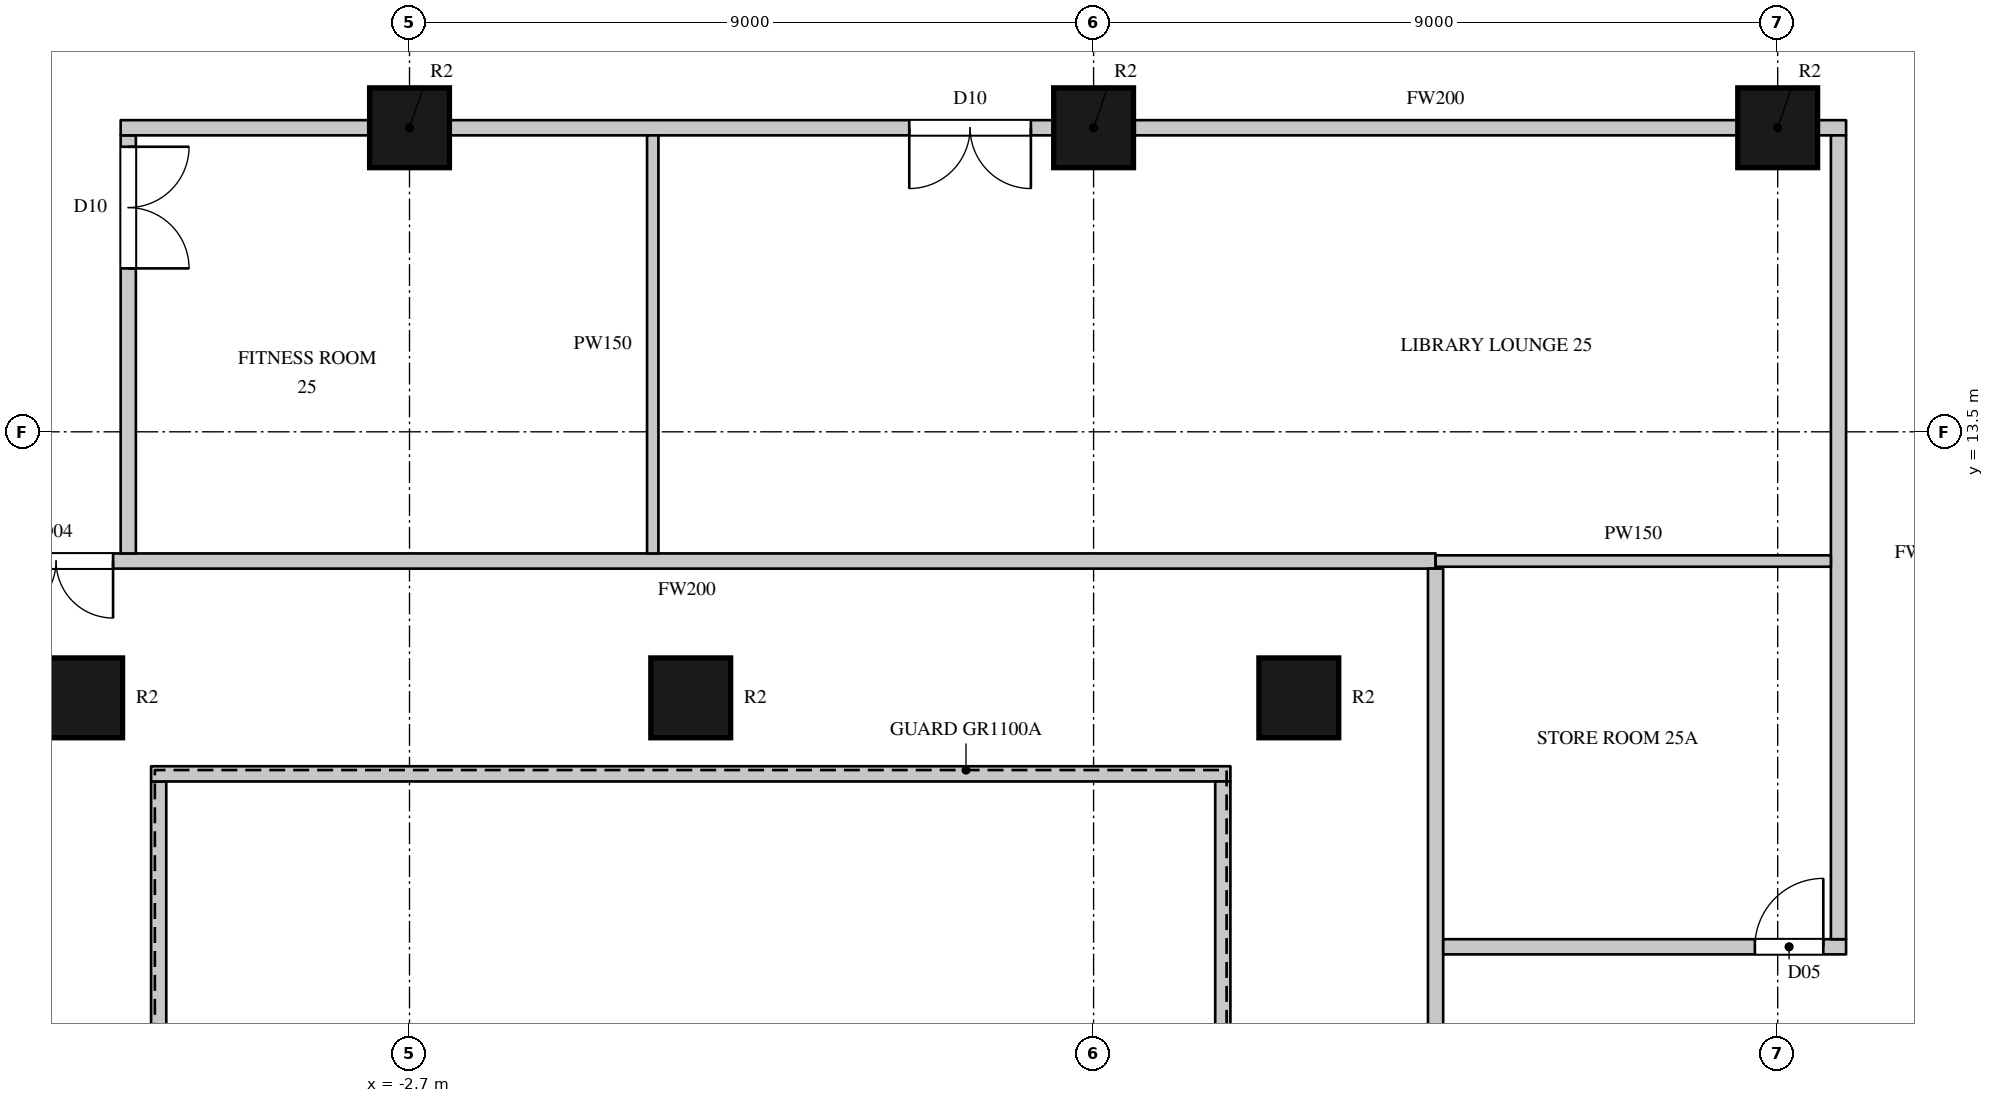
"""IFC4 building model, lengths in metres.
Left out: names, types, materials, properties, quantities, classifications, styles, units other than length and angle.
Written with IfcOpenShell. Run it as: python <this file> out.ifc"""

import sys

from ifc_helpers import new_model, si_unit, direction, frame, frame_2d, origin, origin_2d, place, context, subcontext, project, spatial, rectangle, circle, extrude, element, fill, save


model = new_model("IFC4")
c1 = context("Model", 3, precision=1e-05, world=origin(), true_north=direction((0.0, 1.0)))
c2 = subcontext(c1, "Body", "Model", "MODEL_VIEW")
j1 = project(units=[si_unit("LENGTHUNIT", "METRE"), si_unit("PLANEANGLEUNIT", "RADIAN")], contexts=[c1])
p1 = place(None, origin())
s1 = spatial("IfcSite", under=j1, at=p1, CompositionType="ELEMENT")
p2 = place(p1, origin())
s2 = spatial("IfcBuilding", under=s1, at=p2, CompositionType="ELEMENT")
p3 = place(p2, frame((0.0, 0.0, 120.3)))
s3 = spatial("IfcBuildingStorey", under=s2, at=p3, CompositionType="ELEMENT", Elevation=120.3)
for number, where, z_axis, x_axis in (
    (1, (-2.7, 17.5, 0.0), (0.0, 0.0, 1.0), (1.0, 0.0, 0.0)),
    (2, (6.3, 17.5, 0.0), (0.0, 0.0, 1.0), (1.0, 0.0, 0.0)),
    (3, (15.3, 17.5, 0.0), (0.0, 0.0, 1.0), (1.0, 0.0, 0.0)),
    (4, (-7.0, 10.0, 0.0), (0.0, 0.0, 1.0), (1.0, 0.0, 0.0)),
    (5, (1.0, 10.0, 0.0), (0.0, 0.0, 1.0), (1.0, 0.0, 0.0)),
    (6, (9.0, 10.0, 0.0), (0.0, 0.0, 1.0), (1.0, 0.0, 0.0)),
):
    element("IfcColumn", number, at=place(p3, frame(where, z_axis=z_axis, x_axis=x_axis)), inside=s3, PredefinedType="COLUMN", context=c2, shape_type="SweptSolid", body=[
        extrude(circle(Radius=0.525, at=origin_2d()), origin(), (0.0, 0.0, 1.0), 3.6),
    ])
p4 = place(p3, frame((-8.9, 11.8, 0.0), z_axis=(0.0, 0.0, 1.0), x_axis=(1.0, 0.0, 0.0)))
e7 = element("IfcWall", 7, at=p4, inside=s3, PredefinedType="PARTITIONING", context=c2, shape_type="SweptSolid", body=[
    extrude(rectangle(XDim=19.7, YDim=0.2, at=frame_2d((9.85, 0.0))), origin(), (0.0, 0.0, 1.0), 3.3),
])
p5 = place(p4, frame((0.8, 0.0, 0.0)))
e8 = element("IfcOpeningElement", 8, at=p5, cuts=e7, PredefinedType="OPENING", context=c2, shape_type="SweptSolid", body=[
    extrude(rectangle(XDim=1.5, YDim=2.2, at=frame_2d((0.75, 1.1))), frame((0.0, 0.11, 0.0), z_axis=(0.0, -1.0, 0.0), x_axis=(1.0, 0.0, 0.0)), (0.0, 0.0, 1.0), 0.22),
])
p6 = place(p3, frame((-6.4, 11.9, 0.0), z_axis=(0.0, 0.0, 1.0), x_axis=(0.0, 1.0, 0.0)))
e9 = element("IfcWall", 9, at=p6, inside=s3, PredefinedType="PARTITIONING", context=c2, shape_type="SweptSolid", body=[
    extrude(rectangle(XDim=5.5, YDim=0.2, at=frame_2d((2.75, 0.0))), origin(), (0.0, 0.0, 1.0), 3.3),
])
p7 = place(p6, frame((3.75, 0.0, 0.0)))
e10 = element("IfcOpeningElement", 10, at=p7, cuts=e9, PredefinedType="OPENING", context=c2, shape_type="SweptSolid", body=[
    extrude(rectangle(XDim=1.6, YDim=2.4, at=frame_2d((0.8, 1.2))), frame((0.0, 0.11, 0.0), z_axis=(0.0, -1.0, 0.0), x_axis=(1.0, 0.0, 0.0)), (0.0, 0.0, 1.0), 0.22),
])
p8 = place(p3, frame((-6.5, 17.5, 0.0), z_axis=(0.0, 0.0, 1.0), x_axis=(1.0, 0.0, 0.0)))
e11 = element("IfcWall", 11, at=p8, inside=s3, PredefinedType="PARTITIONING", context=c2, shape_type="SweptSolid", body=[
    extrude(rectangle(XDim=3.275, YDim=0.2, at=frame_2d((1.637, 0.0))), origin(), (0.0, 0.0, 1.0), 2.75),
])
p9 = place(p3, frame((-2.175, 17.5, 0.0), z_axis=(0.0, 0.0, 1.0), x_axis=(1.0, 0.0, 0.0)))
e12 = element("IfcWall", 12, at=p9, inside=s3, PredefinedType="PARTITIONING", context=c2, shape_type="SweptSolid", body=[
    extrude(rectangle(XDim=7.95, YDim=0.2, at=frame_2d((3.975, 0.0))), origin(), (0.0, 0.0, 1.0), 2.75),
])
p10 = place(p9, frame((6.05, 0.0, 0.0)))
e13 = element("IfcOpeningElement", 13, at=p10, cuts=e12, PredefinedType="OPENING", context=c2, shape_type="SweptSolid", body=[
    extrude(rectangle(XDim=1.6, YDim=2.4, at=frame_2d((0.8, 1.2))), frame((0.0, 0.11, 0.0), z_axis=(0.0, -1.0, 0.0), x_axis=(1.0, 0.0, 0.0)), (0.0, 0.0, 1.0), 0.22),
])
p11 = place(p3, frame((6.825, 17.5, 0.0), z_axis=(0.0, 0.0, 1.0), x_axis=(1.0, 0.0, 0.0)))
e14 = element("IfcWall", 14, at=p11, inside=s3, PredefinedType="PARTITIONING", context=c2, shape_type="SweptSolid", body=[
    extrude(rectangle(XDim=7.95, YDim=0.2, at=frame_2d((3.975, 0.0))), origin(), (0.0, 0.0, 1.0), 2.75),
])
p12 = place(p3, frame((15.825, 17.5, 0.0), z_axis=(0.0, 0.0, 1.0), x_axis=(1.0, 0.0, 0.0)))
e15 = element("IfcWall", 15, at=p12, inside=s3, PredefinedType="PARTITIONING", context=c2, shape_type="SweptSolid", body=[
    extrude(rectangle(XDim=0.375, YDim=0.2, at=frame_2d((0.188, 0.0))), origin(), (0.0, 0.0, 1.0), 3.3),
])
p13 = place(p3, frame((-6.0, -8.9, 0.0), z_axis=(0.0, 0.0, 1.0), x_axis=(0.0, 1.0, 0.0)))
e16 = element("IfcWall", 16, at=p13, inside=s3, PredefinedType="PARTITIONING", context=c2, shape_type="SweptSolid", body=[
    extrude(rectangle(XDim=17.8, YDim=0.2, at=frame_2d((8.9, 0.0))), origin(), (0.0, 0.0, 1.0), 3.3),
])
p14 = place(p3, frame((-6.1, 9.0, 0.0), z_axis=(0.0, 0.0, 1.0), x_axis=(1.0, 0.0, 0.0)))
e17 = element("IfcWall", 17, at=p14, inside=s3, PredefinedType="PARTITIONING", context=c2, shape_type="SweptSolid", body=[
    extrude(rectangle(XDim=14.2, YDim=0.2, at=frame_2d((7.1, 0.0))), origin(), (0.0, 0.0, 1.0), 3.3),
])
p15 = place(p3, frame((8.0, -8.9, 0.0), z_axis=(0.0, 0.0, 1.0), x_axis=(0.0, 1.0, 0.0)))
e18 = element("IfcWall", 18, at=p15, inside=s3, PredefinedType="PARTITIONING", context=c2, shape_type="SweptSolid", body=[
    extrude(rectangle(XDim=17.8, YDim=0.2, at=frame_2d((8.9, 0.0))), origin(), (0.0, 0.0, 1.0), 3.3),
])
p16 = place(p3, frame((10.799, -12.5, 0.0), z_axis=(0.0, 0.0, 1.0), x_axis=(0.0, 1.0, 0.0)))
e19 = element("IfcWall", 19, at=p16, inside=s3, PredefinedType="PARTITIONING", context=c2, shape_type="SweptSolid", body=[
    extrude(rectangle(XDim=24.2, YDim=0.2, at=frame_2d((12.1, 0.0))), origin(), (0.0, 0.0, 1.0), 3.3),
])
p17 = place(p16, frame((13.15, 0.0, 0.0)))
e20 = element("IfcOpeningElement", 20, at=p17, cuts=e19, PredefinedType="OPENING", context=c2, shape_type="SweptSolid", body=[
    extrude(rectangle(XDim=1.5, YDim=2.2, at=frame_2d((0.75, 1.1))), frame((0.0, 0.11, 0.0), z_axis=(0.0, -1.0, 0.0), x_axis=(1.0, 0.0, 0.0)), (0.0, 0.0, 1.0), 0.22),
])
p18 = place(p3, frame((10.9, 6.725, 0.0), z_axis=(0.0, 0.0, 1.0), x_axis=(1.0, 0.0, 0.0)))
e21 = element("IfcWall", 21, at=p18, inside=s3, PredefinedType="PARTITIONING", context=c2, shape_type="SweptSolid", body=[
    extrude(rectangle(XDim=5.3, YDim=0.2, at=frame_2d((2.65, 0.0))), origin(), (0.0, 0.0, 1.0), 3.3),
])
p19 = place(p18, frame((4.1, 0.0, 0.0)))
e22 = element("IfcOpeningElement", 22, at=p19, cuts=e21, PredefinedType="OPENING", context=c2, shape_type="SweptSolid", body=[
    extrude(rectangle(XDim=0.9, YDim=2.2, at=frame_2d((0.45, 1.1))), frame((0.0, 0.11, 0.0), z_axis=(0.0, -1.0, 0.0), x_axis=(1.0, 0.0, 0.0)), (0.0, 0.0, 1.0), 0.22),
])
p20 = place(p3, frame((16.1, 6.825, 0.0), z_axis=(0.0, 0.0, 1.0), x_axis=(0.0, 1.0, 0.0)))
e23 = element("IfcWall", 23, at=p20, inside=s3, PredefinedType="PARTITIONING", context=c2, shape_type="SweptSolid", body=[
    extrude(rectangle(XDim=10.575, YDim=0.2, at=frame_2d((5.288, 0.0))), origin(), (0.0, 0.0, 1.0), 3.3),
])
p21 = place(p3, frame((0.5, 11.9, 0.0), z_axis=(0.0, 0.0, 1.0), x_axis=(0.0, 1.0, 0.0)))
e24 = element("IfcWall", 24, at=p21, inside=s3, PredefinedType="PARTITIONING", context=c2, shape_type="SweptSolid", body=[
    extrude(rectangle(XDim=5.5, YDim=0.15, at=frame_2d((2.75, 0.0))), origin(), (0.0, 0.0, 1.0), 3.3),
])
p22 = place(p3, frame((10.8, 11.8, 0.0), z_axis=(0.0, 0.0, 1.0), x_axis=(1.0, 0.0, 0.0)))
e25 = element("IfcWall", 25, at=p22, inside=s3, PredefinedType="PARTITIONING", context=c2, shape_type="SweptSolid", body=[
    extrude(rectangle(XDim=5.2, YDim=0.15, at=frame_2d((2.6, 0.0))), origin(), (0.0, 0.0, 1.0), 3.3),
])
p23 = place(p5, origin())
e26 = element("IfcDoor", 26, at=p23, inside=s3, OperationType="DOUBLE_DOOR_SINGLE_SWING", PredefinedType="DOOR", context=c2, shape_type="SweptSolid", body=[
    extrude(rectangle(XDim=1.5, YDim=2.2, at=frame_2d((0.75, 1.1))), frame((0.0, 0.025, 0.0), z_axis=(0.0, -1.0, 0.0), x_axis=(1.0, 0.0, 0.0)), (0.0, 0.0, 1.0), 0.05),
])
fill(e8, e26)
p24 = place(p7, origin())
e27 = element("IfcDoor", 27, at=p24, inside=s3, OperationType="DOUBLE_DOOR_SINGLE_SWING", PredefinedType="DOOR", context=c2, shape_type="SweptSolid", body=[
    extrude(rectangle(XDim=1.6, YDim=2.4, at=frame_2d((0.8, 1.2))), frame((0.0, 0.025, 0.0), z_axis=(0.0, -1.0, 0.0), x_axis=(1.0, 0.0, 0.0)), (0.0, 0.0, 1.0), 0.05),
])
fill(e10, e27)
p25 = place(p10, origin())
e28 = element("IfcDoor", 28, at=p25, inside=s3, OperationType="DOUBLE_DOOR_SINGLE_SWING", PredefinedType="DOOR", context=c2, shape_type="SweptSolid", body=[
    extrude(rectangle(XDim=1.6, YDim=2.4, at=frame_2d((0.8, 1.2))), frame((0.0, 0.025, 0.0), z_axis=(0.0, -1.0, 0.0), x_axis=(1.0, 0.0, 0.0)), (0.0, 0.0, 1.0), 0.05),
])
fill(e13, e28)
p26 = place(p19, origin())
e29 = element("IfcDoor", 29, at=p26, inside=s3, OperationType="SINGLE_SWING_RIGHT", PredefinedType="DOOR", context=c2, shape_type="SweptSolid", body=[
    extrude(rectangle(XDim=0.9, YDim=2.2, at=frame_2d((0.45, 1.1))), frame((0.0, 0.025, 0.0), z_axis=(0.0, -1.0, 0.0), x_axis=(1.0, 0.0, 0.0)), (0.0, 0.0, 1.0), 0.05),
])
fill(e22, e29)
save(model, sys.argv[1])
